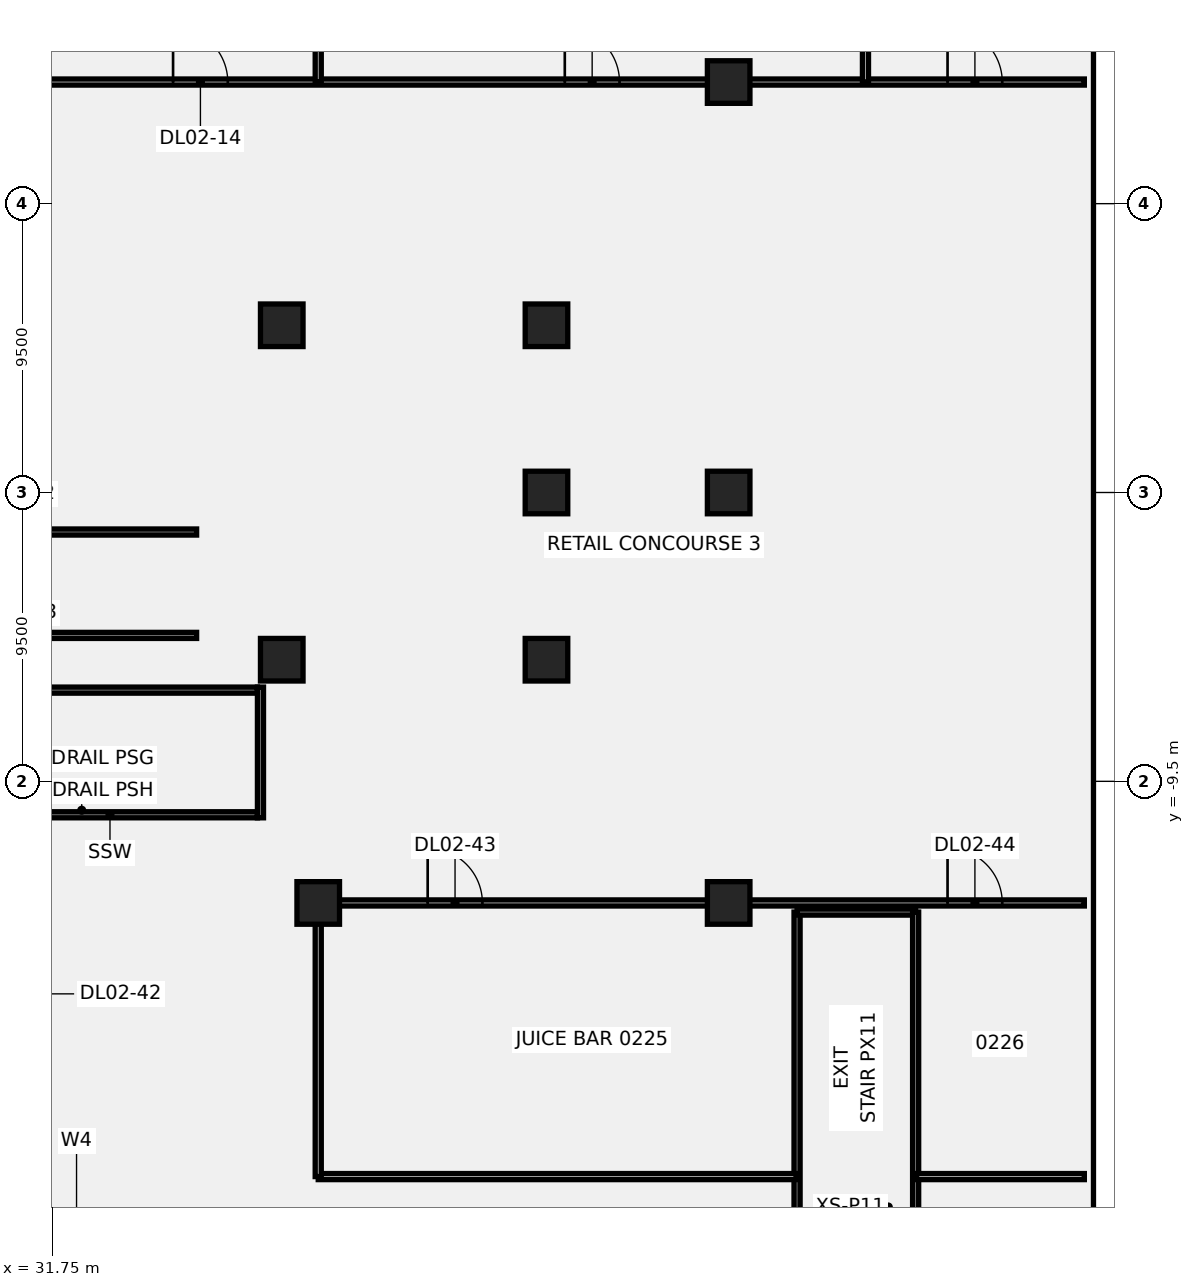
"""IFC4 building model, lengths in metres.
Left out: names, types, materials, properties, quantities, classifications, styles, units other than length and angle.
Written with IfcOpenShell. Run it as: python <this file> out.ifc"""

import sys

from ifc_helpers import new_model, si_unit, direction, frame, frame_2d, origin, origin_2d, place, context, subcontext, project, spatial, polyline, rectangle, outline, extrude, element, fill, save


model = new_model("IFC4")
c1 = context("Model", 3, precision=1e-05, world=origin(), true_north=direction((0.0, 1.0)))
c2 = subcontext(c1, "Body", "Model", "MODEL_VIEW")
j1 = project(units=[si_unit("LENGTHUNIT", "METRE"), si_unit("PLANEANGLEUNIT", "RADIAN")], contexts=[c1])
p1 = place(None, origin())
s1 = spatial("IfcSite", under=j1, at=p1, CompositionType="ELEMENT")
p2 = place(p1, origin())
s2 = spatial("IfcBuilding", under=s1, at=p2, CompositionType="ELEMENT")
p3 = place(p2, frame((0.0, 0.0, 15.0)))
s3 = spatial("IfcBuildingStorey", under=s2, at=p3, CompositionType="ELEMENT", Elevation=15.0)
for number, where, z_axis, x_axis in (
    (1, (39.3, 5.5, -0.5), (0.0, 0.0, 1.0), (1.0, 0.0, 0.0)),
    (2, (39.3, -5.5, -0.5), (0.0, 0.0, 1.0), (1.0, 0.0, 0.0)),
    (3, (48.008, -5.5, -0.5), (0.0, 0.0, 1.0), (1.0, 0.0, 0.0)),
    (4, (48.008, 0.0, -0.5), (0.0, 0.0, 1.0), (1.0, 0.0, 0.0)),
    (5, (48.008, 5.5, -0.5), (0.0, 0.0, 1.0), (1.0, 0.0, 0.0)),
    (6, (40.5, -13.5, -0.5), (0.0, 0.0, 1.0), (1.0, 0.0, 0.0)),
    (7, (54.0, -13.5, -0.5), (0.0, 0.0, 1.0), (1.0, 0.0, 0.0)),
    (8, (54.0, 0.0, -0.5), (0.0, 0.0, 1.0), (1.0, 0.0, 0.0)),
    (9, (54.0, 13.5, -0.5), (0.0, 0.0, 1.0), (1.0, 0.0, 0.0)),
):
    element("IfcColumn", number, at=place(p3, frame(where, z_axis=z_axis, x_axis=x_axis)), inside=s3, PredefinedType="COLUMN", context=c2, shape_type="SweptSolid", body=[
        extrude(rectangle(XDim=1.4, YDim=1.4, at=origin_2d()), origin(), (0.0, 0.0, 1.0), 5.0),
    ])
p4 = place(p3, frame((56.25, -25.3, 0.0), z_axis=(0.0, 0.0, 1.0), x_axis=(0.0, 1.0, 0.0)))
e10 = element("IfcWall", 10, at=p4, inside=s3, PredefinedType="PARTITIONING", context=c2, shape_type="SweptSolid", body=[
    extrude(rectangle(XDim=11.5, YDim=0.2, at=frame_2d((5.75, 0.0))), origin(), (0.0, 0.0, 1.0), 4.5),
])
p5 = place(p3, frame((56.25, -13.8, 0.0), z_axis=(0.0, 0.0, 1.0), x_axis=(1.0, 0.0, 0.0)))
e11 = element("IfcWall", 11, at=p5, inside=s3, PredefinedType="PARTITIONING", context=c2, shape_type="SweptSolid", body=[
    extrude(rectangle(XDim=3.9, YDim=0.2, at=frame_2d((1.95, 0.0))), origin(), (0.0, 0.0, 1.0), 4.5),
])
p6 = place(p3, frame((60.15, -25.3, 0.0), z_axis=(0.0, 0.0, 1.0), x_axis=(0.0, 1.0, 0.0)))
e12 = element("IfcWall", 12, at=p6, inside=s3, PredefinedType="PARTITIONING", context=c2, shape_type="SweptSolid", body=[
    extrude(rectangle(XDim=11.5, YDim=0.2, at=frame_2d((5.75, 0.0))), origin(), (0.0, 0.0, 1.0), 4.5),
])
p7 = place(p3, frame((22.5, 13.5, 0.0), z_axis=(0.0, 0.0, 1.0), x_axis=(1.0, 0.0, 0.0)))
e13 = element("IfcWall", 13, at=p7, inside=s3, PredefinedType="PARTITIONING", context=c2, shape_type="SweptSolid", body=[
    extrude(rectangle(XDim=43.199, YDim=0.2, at=frame_2d((21.6, 0.0))), origin(), (0.0, 0.0, 1.0), 4.5),
])
p8 = place(p7, frame((2.714, 0.0, 0.0)))
e14 = element("IfcOpeningElement", 14, at=p8, cuts=e13, PredefinedType="OPENING", context=c2, shape_type="SweptSolid", body=[
    extrude(rectangle(XDim=1.8, YDim=2.1, at=frame_2d((0.9, 1.05))), frame((0.0, 0.11, 0.0), z_axis=(0.0, -1.0, 0.0), x_axis=(1.0, 0.0, 0.0)), (0.0, 0.0, 1.0), 0.22),
])
p9 = place(p7, frame((13.225, 0.0, 0.0)))
e15 = element("IfcOpeningElement", 15, at=p9, cuts=e13, PredefinedType="OPENING", context=c2, shape_type="SweptSolid", body=[
    extrude(rectangle(XDim=1.8, YDim=2.1, at=frame_2d((0.9, 1.05))), frame((0.0, 0.11, 0.0), z_axis=(0.0, -1.0, 0.0), x_axis=(1.0, 0.0, 0.0)), (0.0, 0.0, 1.0), 0.22),
])
p10 = place(p7, frame((26.11, 0.0, 0.0)))
e16 = element("IfcOpeningElement", 16, at=p10, cuts=e13, PredefinedType="OPENING", context=c2, shape_type="SweptSolid", body=[
    extrude(rectangle(XDim=1.8, YDim=2.1, at=frame_2d((0.9, 1.05))), frame((0.0, 0.11, 0.0), z_axis=(0.0, -1.0, 0.0), x_axis=(1.0, 0.0, 0.0)), (0.0, 0.0, 1.0), 0.22),
])
p11 = place(p7, frame((38.7, 0.0, 0.0)))
e17 = element("IfcOpeningElement", 17, at=p11, cuts=e13, PredefinedType="OPENING", context=c2, shape_type="SweptSolid", body=[
    extrude(rectangle(XDim=1.8, YDim=2.1, at=frame_2d((0.9, 1.05))), frame((0.0, 0.11, 0.0), z_axis=(0.0, -1.0, 0.0), x_axis=(1.0, 0.0, 0.0)), (0.0, 0.0, 1.0), 0.22),
])
p12 = place(p3, frame((40.5, 13.5, 0.0), z_axis=(0.0, 0.0, 1.0), x_axis=(0.0, 1.0, 0.0)))
e18 = element("IfcWall", 18, at=p12, inside=s3, PredefinedType="PARTITIONING", context=c2, shape_type="SweptSolid", body=[
    extrude(rectangle(XDim=2.92, YDim=0.2, at=frame_2d((1.46, 0.0))), origin(), (0.0, 0.0, 1.0), 4.5),
])
p13 = place(p3, frame((40.5, -22.5, 0.0), z_axis=(0.0, 0.0, 1.0), x_axis=(1.0, 0.0, 0.0)))
e19 = element("IfcWall", 19, at=p13, inside=s3, PredefinedType="PARTITIONING", context=c2, shape_type="SweptSolid", body=[
    extrude(rectangle(XDim=15.72, YDim=0.2, at=frame_2d((7.86, 0.0))), origin(), (0.0, 0.0, 1.0), 4.5),
])
p14 = place(p3, frame((40.5, -22.5, 0.0), z_axis=(0.0, 0.0, 1.0), x_axis=(0.0, 1.0, 0.0)))
e20 = element("IfcWall", 20, at=p14, inside=s3, PredefinedType="PARTITIONING", context=c2, shape_type="SweptSolid", body=[
    extrude(rectangle(XDim=9.0, YDim=0.2, at=frame_2d((4.5, 0.0))), origin(), (0.0, 0.0, 1.0), 4.5),
])
p15 = place(p3, frame((40.5, -13.5, 0.0), z_axis=(0.0, 0.0, 1.0), x_axis=(1.0, 0.0, 0.0)))
e21 = element("IfcWall", 21, at=p15, inside=s3, PredefinedType="PARTITIONING", context=c2, shape_type="SweptSolid", body=[
    extrude(rectangle(XDim=25.199, YDim=0.2, at=frame_2d((12.6, 0.0))), origin(), (0.0, 0.0, 1.0), 4.5),
])
p16 = place(p15, frame((3.6, 0.0, 0.0)))
e22 = element("IfcOpeningElement", 22, at=p16, cuts=e21, PredefinedType="OPENING", context=c2, shape_type="SweptSolid", body=[
    extrude(rectangle(XDim=1.8, YDim=2.1, at=frame_2d((0.9, 1.05))), frame((0.0, 0.11, 0.0), z_axis=(0.0, -1.0, 0.0), x_axis=(1.0, 0.0, 0.0)), (0.0, 0.0, 1.0), 0.22),
])
p17 = place(p15, frame((20.7, 0.0, 0.0)))
e23 = element("IfcOpeningElement", 23, at=p17, cuts=e21, PredefinedType="OPENING", context=c2, shape_type="SweptSolid", body=[
    extrude(rectangle(XDim=1.8, YDim=2.1, at=frame_2d((0.9, 1.05))), frame((0.0, 0.11, 0.0), z_axis=(0.0, -1.0, 0.0), x_axis=(1.0, 0.0, 0.0)), (0.0, 0.0, 1.0), 0.22),
])
p18 = place(p3, frame((58.5, 13.5, 0.0), z_axis=(0.0, 0.0, 1.0), x_axis=(0.0, 1.0, 0.0)))
e24 = element("IfcWall", 24, at=p18, inside=s3, PredefinedType="PARTITIONING", context=c2, shape_type="SweptSolid", body=[
    extrude(rectangle(XDim=9.0, YDim=0.2, at=frame_2d((4.5, 0.0))), origin(), (0.0, 0.0, 1.0), 4.5),
])
p19 = place(p3, frame((60.18, -22.5, 0.0), z_axis=(0.0, 0.0, 1.0), x_axis=(1.0, 0.0, 0.0)))
e25 = element("IfcWall", 25, at=p19, inside=s3, PredefinedType="PARTITIONING", context=c2, shape_type="SweptSolid", body=[
    extrude(rectangle(XDim=5.519, YDim=0.2, at=frame_2d((2.76, 0.0))), origin(), (0.0, 0.0, 1.0), 4.5),
])
for number, where, z_axis, x_axis in (
    (26, (28.8, -10.6, 0.0), (0.0, 0.0, 1.0), (1.0, 0.0, 0.0)),
    (27, (28.8, -6.5, 0.0), (0.0, 0.0, 1.0), (1.0, 0.0, 0.0)),
):
    element("IfcWall", number, at=place(p3, frame(where, z_axis=z_axis, x_axis=x_axis)), inside=s3, PredefinedType="SOLIDWALL", context=c2, shape_type="SweptSolid", body=[
        extrude(rectangle(XDim=9.7, YDim=0.2, at=frame_2d((4.85, 0.0))), origin(), (0.0, 0.0, 1.0), 4.5),
    ])
p20 = place(p3, frame((38.6, -10.7, 0.0), z_axis=(0.0, 0.0, 1.0), x_axis=(0.0, 1.0, 0.0)))
e28 = element("IfcWall", 28, at=p20, inside=s3, PredefinedType="SOLIDWALL", context=c2, shape_type="SweptSolid", body=[
    extrude(rectangle(XDim=4.3, YDim=0.2, at=frame_2d((2.15, 0.0))), origin(), (0.0, 0.0, 1.0), 4.5),
])
p21 = place(p3, frame((29.8, -1.3, 0.0), z_axis=(0.0, 0.0, 1.0), x_axis=(1.0, 0.0, 0.0)))
e29 = element("IfcWall", 29, at=p21, inside=s3, PredefinedType="SHEAR", context=c2, shape_type="SweptSolid", body=[
    extrude(rectangle(XDim=6.7, YDim=0.2, at=frame_2d((3.35, 0.0))), origin(), (0.0, 0.0, 1.0), 4.5),
])
p22 = place(p21, frame((0.35, 0.0, 0.0)))
e30 = element("IfcOpeningElement", 30, at=p22, cuts=e29, PredefinedType="OPENING", context=c2, shape_type="SweptSolid", body=[
    extrude(rectangle(XDim=1.0, YDim=2.1, at=frame_2d((0.5, 1.05))), frame((0.0, 0.11, 0.0), z_axis=(0.0, -1.0, 0.0), x_axis=(1.0, 0.0, 0.0)), (0.0, 0.0, 1.0), 0.22),
])
p23 = place(p3, frame((29.8, -4.7, 0.0), z_axis=(0.0, 0.0, 1.0), x_axis=(1.0, 0.0, 0.0)))
e31 = element("IfcWall", 31, at=p23, inside=s3, PredefinedType="SHEAR", context=c2, shape_type="SweptSolid", body=[
    extrude(rectangle(XDim=6.7, YDim=0.2, at=frame_2d((3.35, 0.0))), origin(), (0.0, 0.0, 1.0), 4.5),
])
p24 = place(p3, origin())
e32 = element("IfcWall", 32, at=p24, inside=s3, PredefinedType="SHEAR", context=c2, shape_type="SweptSolid", body=[
    extrude(outline(polyline([(36.3, -4.6), (36.5, -4.6), (36.5, -1.4), (36.3, -1.4), (36.3, -4.6)])), origin(), (0.0, 0.0, 1.0), 4.5),
])
p25 = place(p9, origin())
e33 = element("IfcDoor", 33, at=p25, inside=s3, OperationType="SINGLE_SWING_RIGHT", PredefinedType="DOOR", context=c2, shape_type="SweptSolid", body=[
    extrude(rectangle(XDim=1.8, YDim=2.1, at=frame_2d((0.9, 1.05))), frame((0.0, 0.025, 0.0), z_axis=(0.0, -1.0, 0.0), x_axis=(1.0, 0.0, 0.0)), (0.0, 0.0, 1.0), 0.05),
])
fill(e15, e33)
p26 = place(p10, origin())
e34 = element("IfcDoor", 34, at=p26, inside=s3, OperationType="SINGLE_SWING_LEFT", PredefinedType="DOOR", context=c2, shape_type="SweptSolid", body=[
    extrude(rectangle(XDim=1.8, YDim=2.1, at=frame_2d((0.9, 1.05))), frame((0.0, 0.025, 0.0), z_axis=(0.0, -1.0, 0.0), x_axis=(1.0, 0.0, 0.0)), (0.0, 0.0, 1.0), 0.05),
])
fill(e16, e34)
p27 = place(p11, origin())
e35 = element("IfcDoor", 35, at=p27, inside=s3, OperationType="SINGLE_SWING_RIGHT", PredefinedType="DOOR", context=c2, shape_type="SweptSolid", body=[
    extrude(rectangle(XDim=1.8, YDim=2.1, at=frame_2d((0.9, 1.05))), frame((0.0, 0.025, 0.0), z_axis=(0.0, -1.0, 0.0), x_axis=(1.0, 0.0, 0.0)), (0.0, 0.0, 1.0), 0.05),
])
fill(e17, e35)
p28 = place(p16, origin())
e36 = element("IfcDoor", 36, at=p28, inside=s3, OperationType="SINGLE_SWING_LEFT", PredefinedType="DOOR", context=c2, shape_type="SweptSolid", body=[
    extrude(rectangle(XDim=1.8, YDim=2.1, at=frame_2d((0.9, 1.05))), frame((0.0, 0.025, 0.0), z_axis=(0.0, -1.0, 0.0), x_axis=(1.0, 0.0, 0.0)), (0.0, 0.0, 1.0), 0.05),
])
fill(e22, e36)
p29 = place(p17, origin())
e37 = element("IfcDoor", 37, at=p29, inside=s3, OperationType="SINGLE_SWING_RIGHT", PredefinedType="DOOR", context=c2, shape_type="SweptSolid", body=[
    extrude(rectangle(XDim=1.8, YDim=2.1, at=frame_2d((0.9, 1.05))), frame((0.0, 0.025, 0.0), z_axis=(0.0, -1.0, 0.0), x_axis=(1.0, 0.0, 0.0)), (0.0, 0.0, 1.0), 0.05),
])
fill(e23, e37)
save(model, sys.argv[1])
